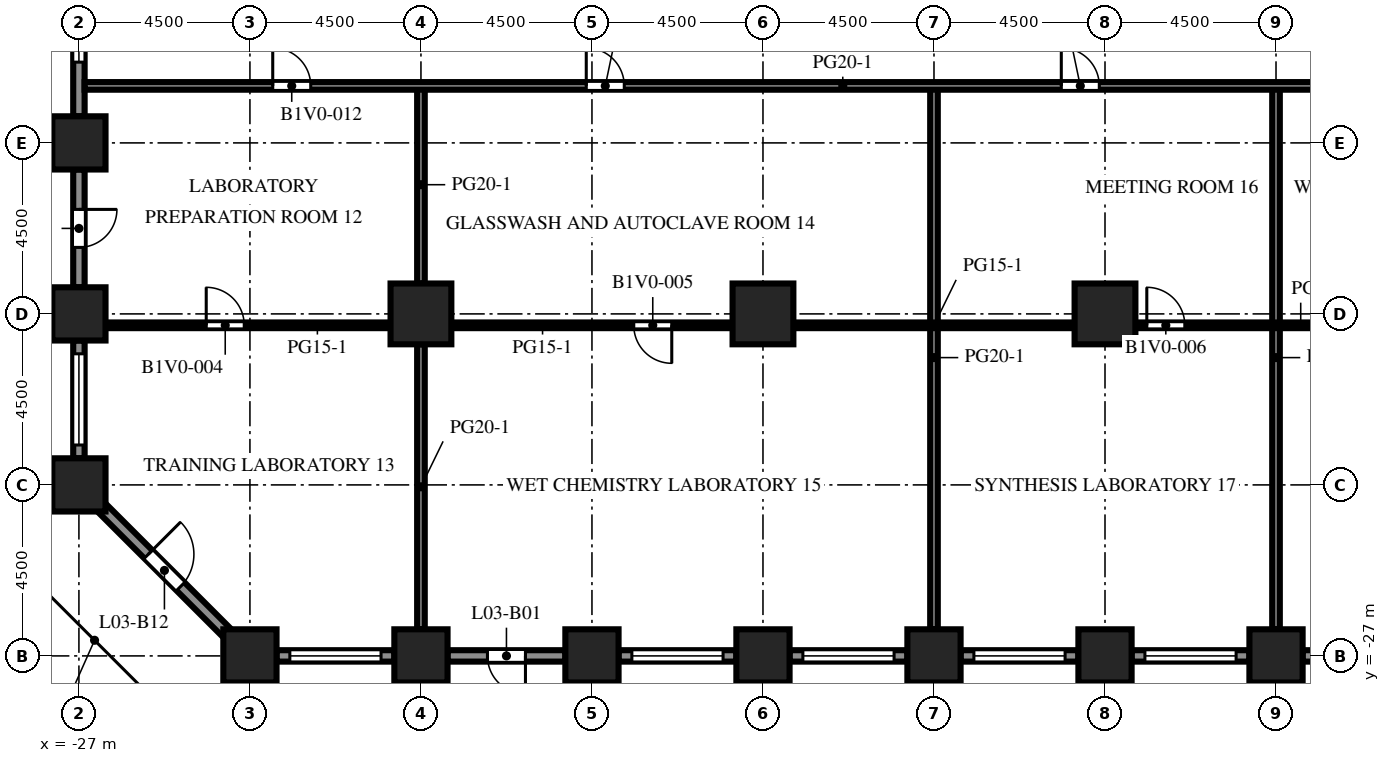
"""IFC4 building model, lengths in metres.
Left out: names, types, materials, properties, quantities, classifications, styles, units other than length and angle.
Written with IfcOpenShell. Run it as: python <this file> out.ifc"""

import sys

from ifc_helpers import new_model, si_unit, direction, frame, frame_2d, origin, origin_2d, place, context, subcontext, project, spatial, rectangle, extrude, element, fill, save


model = new_model("IFC4")
c1 = context("Model", 3, precision=1e-05, world=origin(), true_north=direction((0.0, 1.0)))
c2 = subcontext(c1, "Body", "Model", "MODEL_VIEW")
j1 = project(units=[si_unit("LENGTHUNIT", "METRE"), si_unit("PLANEANGLEUNIT", "RADIAN")], contexts=[c1])
p1 = place(None, origin())
s1 = spatial("IfcSite", under=j1, at=p1, CompositionType="ELEMENT")
p2 = place(p1, origin())
s2 = spatial("IfcBuilding", under=s1, at=p2, CompositionType="ELEMENT")
p3 = place(p2, frame((0.0, 0.0, 15.4)))
s3 = spatial("IfcBuildingStorey", under=s2, at=p3, CompositionType="ELEMENT", Elevation=15.4)
for number, where, z_axis, x_axis in (
    (1, (-27.0, -22.5, 0.0), (0.0, 0.0, 1.0), (1.0, 0.0, 0.0)),
    (2, (-27.0, -18.0, 0.0), (0.0, 0.0, 1.0), (1.0, 0.0, 0.0)),
    (3, (-27.0, -13.5, 0.0), (0.0, 0.0, 1.0), (1.0, 0.0, 0.0)),
    (4, (-22.5, -27.0, 0.0), (0.0, 0.0, 1.0), (1.0, 0.0, 0.0)),
    (5, (-18.0, -27.0, 0.0), (0.0, 0.0, 1.0), (1.0, 0.0, 0.0)),
    (6, (-13.5, -27.0, 0.0), (0.0, 0.0, 1.0), (1.0, 0.0, 0.0)),
    (7, (-9.0, -27.0, 0.0), (0.0, 0.0, 1.0), (1.0, 0.0, 0.0)),
    (8, (-4.5, -27.0, 0.0), (0.0, 0.0, 1.0), (1.0, 0.0, 0.0)),
    (9, (0.0, -27.0, 0.0), (0.0, 0.0, 1.0), (1.0, 0.0, 0.0)),
    (10, (4.5, -27.0, 0.0), (0.0, 0.0, 1.0), (1.0, 0.0, 0.0)),
):
    element("IfcColumn", number, at=place(p3, frame(where, z_axis=z_axis, x_axis=x_axis)), inside=s3, PredefinedType="COLUMN", context=c2, shape_type="SweptSolid", body=[
        extrude(rectangle(XDim=1.4, YDim=1.4, at=origin_2d()), origin(), (0.0, 0.0, 1.0), 4.1),
    ])
for number, where, z_axis, x_axis in (
    (11, (-18.0, -18.0, 0.0), (0.0, 0.0, 1.0), (1.0, 0.0, 0.0)),
    (12, (-9.0, -18.0, 0.0), (0.0, 0.0, 1.0), (1.0, 0.0, 0.0)),
    (13, (0.0, -18.0, 0.0), (0.0, 0.0, 1.0), (1.0, 0.0, 0.0)),
):
    element("IfcColumn", number, at=place(p3, frame(where, z_axis=z_axis, x_axis=x_axis)), inside=s3, PredefinedType="COLUMN", context=c2, shape_type="SweptSolid", body=[
        extrude(rectangle(XDim=1.6, YDim=1.6, at=origin_2d()), origin(), (0.0, 0.0, 1.0), 4.1),
    ])
p4 = place(p3, frame((-18.7, -27.0, 0.0), z_axis=(0.0, 0.0, 1.0), x_axis=(-1.0, 0.0, 0.0)))
e14 = element("IfcWall", 14, at=p4, inside=s3, PredefinedType="SOLIDWALL", context=c2, shape_type="SweptSolid", body=[
    extrude(rectangle(XDim=3.1, YDim=0.3, at=frame_2d((1.55, 0.0))), origin(), (0.0, 0.0, 1.0), 2.75),
])
p5 = place(p4, frame((0.35, 0.0, 0.8)))
e15 = element("IfcOpeningElement", 15, at=p5, cuts=e14, PredefinedType="OPENING", context=c2, shape_type="SweptSolid", body=[
    extrude(rectangle(XDim=2.4, YDim=1.7, at=frame_2d((1.2, 0.85))), frame((0.0, 0.16, 0.0), z_axis=(0.0, -1.0, 0.0), x_axis=(1.0, 0.0, 0.0)), (0.0, 0.0, 1.0), 0.32),
])
p6 = place(p3, frame((-14.2, -27.0, 0.0), z_axis=(0.0, 0.0, 1.0), x_axis=(-1.0, 0.0, 0.0)))
e16 = element("IfcWall", 16, at=p6, inside=s3, PredefinedType="SOLIDWALL", context=c2, shape_type="SweptSolid", body=[
    extrude(rectangle(XDim=3.1, YDim=0.3, at=frame_2d((1.55, 0.0))), origin(), (0.0, 0.0, 1.0), 2.75),
])
p7 = place(p6, frame((1.05, 0.0, 0.0)))
e17 = element("IfcOpeningElement", 17, at=p7, cuts=e16, PredefinedType="OPENING", context=c2, shape_type="SweptSolid", body=[
    extrude(rectangle(XDim=1.0, YDim=2.2, at=frame_2d((0.5, 1.1))), frame((0.0, 0.16, 0.0), z_axis=(0.0, -1.0, 0.0), x_axis=(1.0, 0.0, 0.0)), (0.0, 0.0, 1.0), 0.32),
])
p8 = place(p3, frame((-9.7, -27.0, 0.0), z_axis=(0.0, 0.0, 1.0), x_axis=(-1.0, 0.0, 0.0)))
e18 = element("IfcWall", 18, at=p8, inside=s3, PredefinedType="SOLIDWALL", context=c2, shape_type="SweptSolid", body=[
    extrude(rectangle(XDim=3.1, YDim=0.3, at=frame_2d((1.55, 0.0))), origin(), (0.0, 0.0, 1.0), 2.75),
])
p9 = place(p8, frame((0.35, 0.0, 0.8)))
e19 = element("IfcOpeningElement", 19, at=p9, cuts=e18, PredefinedType="OPENING", context=c2, shape_type="SweptSolid", body=[
    extrude(rectangle(XDim=2.4, YDim=1.7, at=frame_2d((1.2, 0.85))), frame((0.0, 0.16, 0.0), z_axis=(0.0, -1.0, 0.0), x_axis=(1.0, 0.0, 0.0)), (0.0, 0.0, 1.0), 0.32),
])
p10 = place(p3, frame((-5.2, -27.0, 0.0), z_axis=(0.0, 0.0, 1.0), x_axis=(-1.0, 0.0, 0.0)))
e20 = element("IfcWall", 20, at=p10, inside=s3, PredefinedType="SOLIDWALL", context=c2, shape_type="SweptSolid", body=[
    extrude(rectangle(XDim=3.1, YDim=0.3, at=frame_2d((1.55, 0.0))), origin(), (0.0, 0.0, 1.0), 2.75),
])
p11 = place(p10, frame((0.35, 0.0, 0.8)))
e21 = element("IfcOpeningElement", 21, at=p11, cuts=e20, PredefinedType="OPENING", context=c2, shape_type="SweptSolid", body=[
    extrude(rectangle(XDim=2.4, YDim=1.7, at=frame_2d((1.2, 0.85))), frame((0.0, 0.16, 0.0), z_axis=(0.0, -1.0, 0.0), x_axis=(1.0, 0.0, 0.0)), (0.0, 0.0, 1.0), 0.32),
])
p12 = place(p3, frame((-0.7, -27.0, 0.0), z_axis=(0.0, 0.0, 1.0), x_axis=(-1.0, 0.0, 0.0)))
e22 = element("IfcWall", 22, at=p12, inside=s3, PredefinedType="SOLIDWALL", context=c2, shape_type="SweptSolid", body=[
    extrude(rectangle(XDim=3.1, YDim=0.3, at=frame_2d((1.55, 0.0))), origin(), (0.0, 0.0, 1.0), 2.75),
])
p13 = place(p12, frame((0.35, 0.0, 0.8)))
e23 = element("IfcOpeningElement", 23, at=p13, cuts=e22, PredefinedType="OPENING", context=c2, shape_type="SweptSolid", body=[
    extrude(rectangle(XDim=2.4, YDim=1.7, at=frame_2d((1.2, 0.85))), frame((0.0, 0.16, 0.0), z_axis=(0.0, -1.0, 0.0), x_axis=(1.0, 0.0, 0.0)), (0.0, 0.0, 1.0), 0.32),
])
p14 = place(p3, frame((3.8, -27.0, 0.0), z_axis=(0.0, 0.0, 1.0), x_axis=(-1.0, 0.0, 0.0)))
e24 = element("IfcWall", 24, at=p14, inside=s3, PredefinedType="SOLIDWALL", context=c2, shape_type="SweptSolid", body=[
    extrude(rectangle(XDim=3.1, YDim=0.3, at=frame_2d((1.55, 0.0))), origin(), (0.0, 0.0, 1.0), 2.75),
])
p15 = place(p14, frame((0.35, 0.0, 0.8)))
e25 = element("IfcOpeningElement", 25, at=p15, cuts=e24, PredefinedType="OPENING", context=c2, shape_type="SweptSolid", body=[
    extrude(rectangle(XDim=2.4, YDim=1.7, at=frame_2d((1.2, 0.85))), frame((0.0, 0.16, 0.0), z_axis=(0.0, -1.0, 0.0), x_axis=(1.0, 0.0, 0.0)), (0.0, 0.0, 1.0), 0.32),
])
p16 = place(p3, frame((8.3, -27.0, 0.0), z_axis=(0.0, 0.0, 1.0), x_axis=(-1.0, 0.0, 0.0)))
e26 = element("IfcWall", 26, at=p16, inside=s3, PredefinedType="SOLIDWALL", context=c2, shape_type="SweptSolid", body=[
    extrude(rectangle(XDim=3.1, YDim=0.3, at=frame_2d((1.55, 0.0))), origin(), (0.0, 0.0, 1.0), 2.75),
])
p17 = place(p16, frame((0.35, 0.0, 0.8)))
e27 = element("IfcOpeningElement", 27, at=p17, cuts=e26, PredefinedType="OPENING", context=c2, shape_type="SweptSolid", body=[
    extrude(rectangle(XDim=2.4, YDim=1.7, at=frame_2d((1.2, 0.85))), frame((0.0, 0.16, 0.0), z_axis=(0.0, -1.0, 0.0), x_axis=(1.0, 0.0, 0.0)), (0.0, 0.0, 1.0), 0.32),
])
p18 = place(p3, frame((-27.0, -12.8, 0.0), z_axis=(0.0, 0.0, 1.0), x_axis=(0.0, 1.0, 0.0)))
e28 = element("IfcWall", 28, at=p18, inside=s3, PredefinedType="SOLIDWALL", context=c2, shape_type="SweptSolid", body=[
    extrude(rectangle(XDim=3.1, YDim=0.3, at=frame_2d((1.55, 0.0))), origin(), (0.0, 0.0, 1.0), 2.75),
])
p19 = place(p18, frame((1.425, 0.0, 0.8)))
e29 = element("IfcOpeningElement", 29, at=p19, cuts=e28, PredefinedType="OPENING", context=c2, shape_type="SweptSolid", body=[
    extrude(rectangle(XDim=1.2, YDim=1.7, at=frame_2d((0.6, 0.85))), frame((0.0, 0.16, 0.0), z_axis=(0.0, -1.0, 0.0), x_axis=(1.0, 0.0, 0.0)), (0.0, 0.0, 1.0), 0.32),
])
p20 = place(p3, frame((-27.0, -17.3, 0.0), z_axis=(0.0, 0.0, 1.0), x_axis=(0.0, 1.0, 0.0)))
e30 = element("IfcWall", 30, at=p20, inside=s3, PredefinedType="SOLIDWALL", context=c2, shape_type="SweptSolid", body=[
    extrude(rectangle(XDim=3.1, YDim=0.3, at=frame_2d((1.55, 0.0))), origin(), (0.0, 0.0, 1.0), 2.75),
])
p21 = place(p20, frame((1.05, 0.0, 0.0)))
e31 = element("IfcOpeningElement", 31, at=p21, cuts=e30, PredefinedType="OPENING", context=c2, shape_type="SweptSolid", body=[
    extrude(rectangle(XDim=1.0, YDim=2.2, at=frame_2d((0.5, 1.1))), frame((0.0, 0.16, 0.0), z_axis=(0.0, -1.0, 0.0), x_axis=(1.0, 0.0, 0.0)), (0.0, 0.0, 1.0), 0.32),
])
p22 = place(p3, frame((-27.0, -21.8, 0.0), z_axis=(0.0, 0.0, 1.0), x_axis=(0.0, 1.0, 0.0)))
e32 = element("IfcWall", 32, at=p22, inside=s3, PredefinedType="SOLIDWALL", context=c2, shape_type="SweptSolid", body=[
    extrude(rectangle(XDim=3.1, YDim=0.3, at=frame_2d((1.55, 0.0))), origin(), (0.0, 0.0, 1.0), 2.75),
])
p23 = place(p22, frame((0.35, 0.0, 0.8)))
e33 = element("IfcOpeningElement", 33, at=p23, cuts=e32, PredefinedType="OPENING", context=c2, shape_type="SweptSolid", body=[
    extrude(rectangle(XDim=2.4, YDim=1.7, at=frame_2d((1.2, 0.85))), frame((0.0, 0.16, 0.0), z_axis=(0.0, -1.0, 0.0), x_axis=(1.0, 0.0, 0.0)), (0.0, 0.0, 1.0), 0.32),
])
p24 = place(p3, frame((-23.094, -26.406, 0.0), z_axis=(0.0, 0.0, 1.0), x_axis=(-0.707106781187, 0.707106781187, 0.0)))
e34 = element("IfcWall", 34, at=p24, inside=s3, PredefinedType="SOLIDWALL", context=c2, shape_type="SweptSolid", body=[
    extrude(rectangle(XDim=4.684, YDim=0.3, at=frame_2d((2.342, 0.0))), origin(), (0.0, 0.0, 1.0), 2.75),
])
p25 = place(p24, frame((1.742, 0.0, 0.0)))
e35 = element("IfcOpeningElement", 35, at=p25, cuts=e34, PredefinedType="OPENING", context=c2, shape_type="SweptSolid", body=[
    extrude(rectangle(XDim=1.2, YDim=2.2, at=frame_2d((0.6, 1.1))), frame((0.0, 0.16, 0.0), z_axis=(0.0, -1.0, 0.0), x_axis=(1.0, 0.0, 0.0)), (0.0, 0.0, 1.0), 0.32),
])
p26 = place(p3, frame((-18.0, -26.3, 0.0), z_axis=(0.0, 0.0, 1.0), x_axis=(0.0, 1.0, 0.0)))
e36 = element("IfcWall", 36, at=p26, inside=s3, PredefinedType="PARTITIONING", context=c2, shape_type="SweptSolid", body=[
    extrude(rectangle(XDim=7.5, YDim=0.2, at=frame_2d((3.75, 0.0))), origin(), (0.0, 0.0, 1.0), 3.65),
])
p27 = place(p3, frame((-18.0, -17.2, 0.0), z_axis=(0.0, 0.0, 1.0), x_axis=(0.0, 1.0, 0.0)))
e37 = element("IfcWall", 37, at=p27, inside=s3, PredefinedType="PARTITIONING", context=c2, shape_type="SweptSolid", body=[
    extrude(rectangle(XDim=5.2, YDim=0.2, at=frame_2d((2.6, 0.0))), origin(), (0.0, 0.0, 1.0), 3.65),
])
for number, where, z_axis, x_axis in (
    (38, (-4.5, -26.3, 0.0), (0.0, 0.0, 1.0), (0.0, 1.0, 0.0)),
    (39, (4.5, -26.3, 0.0), (0.0, 0.0, 1.0), (0.0, 1.0, 0.0)),
):
    element("IfcWall", number, at=place(p3, frame(where, z_axis=z_axis, x_axis=x_axis)), inside=s3, PredefinedType="PARTITIONING", context=c2, shape_type="SweptSolid", body=[
        extrude(rectangle(XDim=14.3, YDim=0.2, at=frame_2d((7.15, 0.0))), origin(), (0.0, 0.0, 1.0), 3.65),
    ])
p28 = place(p3, frame((-18.8, -18.3, 0.0), z_axis=(0.0, 0.0, 1.0), x_axis=(-1.0, 0.0, 0.0)))
e40 = element("IfcWall", 40, at=p28, inside=s3, PredefinedType="PARTITIONING", context=c2, shape_type="SweptSolid", body=[
    extrude(rectangle(XDim=7.5, YDim=0.15, at=frame_2d((3.75, 0.0))), origin(), (0.0, 0.0, 1.0), 3.65),
])
p29 = place(p28, frame((3.85, 0.0, 0.0)))
e41 = element("IfcOpeningElement", 41, at=p29, cuts=e40, PredefinedType="OPENING", context=c2, shape_type="SweptSolid", body=[
    extrude(rectangle(XDim=1.0, YDim=2.1, at=frame_2d((0.5, 1.05))), frame((0.0, 0.085, 0.0), z_axis=(0.0, -1.0, 0.0), x_axis=(1.0, 0.0, 0.0)), (0.0, 0.0, 1.0), 0.17),
])
p30 = place(p3, frame((-9.8, -18.3, 0.0), z_axis=(0.0, 0.0, 1.0), x_axis=(-1.0, 0.0, 0.0)))
e42 = element("IfcWall", 42, at=p30, inside=s3, PredefinedType="PARTITIONING", context=c2, shape_type="SweptSolid", body=[
    extrude(rectangle(XDim=7.4, YDim=0.15, at=frame_2d((3.7, 0.0))), origin(), (0.0, 0.0, 1.0), 3.65),
])
p31 = place(p30, frame((1.6, 0.0, 0.0)))
e43 = element("IfcOpeningElement", 43, at=p31, cuts=e42, PredefinedType="OPENING", context=c2, shape_type="SweptSolid", body=[
    extrude(rectangle(XDim=1.0, YDim=2.1, at=frame_2d((0.5, 1.05))), frame((0.0, 0.085, 0.0), z_axis=(0.0, -1.0, 0.0), x_axis=(1.0, 0.0, 0.0)), (0.0, 0.0, 1.0), 0.17),
])
p32 = place(p3, frame((-8.2, -18.3, 0.0), z_axis=(0.0, 0.0, 1.0), x_axis=(1.0, 0.0, 0.0)))
e44 = element("IfcWall", 44, at=p32, inside=s3, PredefinedType="PARTITIONING", context=c2, shape_type="SweptSolid", body=[
    extrude(rectangle(XDim=7.4, YDim=0.15, at=frame_2d((3.7, 0.0))), origin(), (0.0, 0.0, 1.0), 3.65),
])
p33 = place(p3, frame((8.2, -18.3, 0.0), z_axis=(0.0, 0.0, 1.0), x_axis=(-1.0, 0.0, 0.0)))
e45 = element("IfcWall", 45, at=p33, inside=s3, PredefinedType="PARTITIONING", context=c2, shape_type="SweptSolid", body=[
    extrude(rectangle(XDim=7.4, YDim=0.15, at=frame_2d((3.7, 0.0))), origin(), (0.0, 0.0, 1.0), 3.65),
])
p34 = place(p33, frame((6.1, 0.0, 0.0)))
e46 = element("IfcOpeningElement", 46, at=p34, cuts=e45, PredefinedType="OPENING", context=c2, shape_type="SweptSolid", body=[
    extrude(rectangle(XDim=1.0, YDim=2.1, at=frame_2d((0.5, 1.05))), frame((0.0, 0.085, 0.0), z_axis=(0.0, -1.0, 0.0), x_axis=(1.0, 0.0, 0.0)), (0.0, 0.0, 1.0), 0.17),
])
p35 = place(p3, frame((26.85, -12.0, 0.0), z_axis=(0.0, 0.0, 1.0), x_axis=(-1.0, 0.0, 0.0)))
e47 = element("IfcWall", 47, at=p35, inside=s3, PredefinedType="PARTITIONING", context=c2, shape_type="SweptSolid", body=[
    extrude(rectangle(XDim=53.7, YDim=0.2, at=frame_2d((26.85, 0.0))), origin(), (0.0, 0.0, 1.0), 3.65),
])
p36 = place(p35, frame((47.75, 0.0, 0.0)))
e48 = element("IfcOpeningElement", 48, at=p36, cuts=e47, PredefinedType="OPENING", context=c2, shape_type="SweptSolid", body=[
    extrude(rectangle(XDim=1.0, YDim=2.1, at=frame_2d((0.5, 1.05))), frame((0.0, 0.11, 0.0), z_axis=(0.0, -1.0, 0.0), x_axis=(1.0, 0.0, 0.0)), (0.0, 0.0, 1.0), 0.22),
])
p37 = place(p35, frame((39.5, 0.0, 0.0)))
e49 = element("IfcOpeningElement", 49, at=p37, cuts=e47, PredefinedType="OPENING", context=c2, shape_type="SweptSolid", body=[
    extrude(rectangle(XDim=1.0, YDim=2.1, at=frame_2d((0.5, 1.05))), frame((0.0, 0.11, 0.0), z_axis=(0.0, -1.0, 0.0), x_axis=(1.0, 0.0, 0.0)), (0.0, 0.0, 1.0), 0.22),
])
p38 = place(p35, frame((27.0, 0.0, 0.0)))
e50 = element("IfcOpeningElement", 50, at=p38, cuts=e47, PredefinedType="OPENING", context=c2, shape_type="SweptSolid", body=[
    extrude(rectangle(XDim=1.0, YDim=2.1, at=frame_2d((0.5, 1.05))), frame((0.0, 0.11, 0.0), z_axis=(0.0, -1.0, 0.0), x_axis=(1.0, 0.0, 0.0)), (0.0, 0.0, 1.0), 0.22),
])
p39 = place(p35, frame((17.0, 0.0, 0.0)))
e51 = element("IfcOpeningElement", 51, at=p39, cuts=e47, PredefinedType="OPENING", context=c2, shape_type="SweptSolid", body=[
    extrude(rectangle(XDim=1.0, YDim=2.1, at=frame_2d((0.5, 1.05))), frame((0.0, 0.11, 0.0), z_axis=(0.0, -1.0, 0.0), x_axis=(1.0, 0.0, 0.0)), (0.0, 0.0, 1.0), 0.22),
])
p40 = place(p35, frame((10.0, 0.0, 0.0)))
e52 = element("IfcOpeningElement", 52, at=p40, cuts=e47, PredefinedType="OPENING", context=c2, shape_type="SweptSolid", body=[
    extrude(rectangle(XDim=1.0, YDim=2.1, at=frame_2d((0.5, 1.05))), frame((0.0, 0.11, 0.0), z_axis=(0.0, -1.0, 0.0), x_axis=(1.0, 0.0, 0.0)), (0.0, 0.0, 1.0), 0.22),
])
p41 = place(p35, frame((4.0, 0.0, 0.0)))
e53 = element("IfcOpeningElement", 53, at=p41, cuts=e47, PredefinedType="OPENING", context=c2, shape_type="SweptSolid", body=[
    extrude(rectangle(XDim=1.0, YDim=2.1, at=frame_2d((0.5, 1.05))), frame((0.0, 0.11, 0.0), z_axis=(0.0, -1.0, 0.0), x_axis=(1.0, 0.0, 0.0)), (0.0, 0.0, 1.0), 0.22),
])
p42 = place(p5, origin())
e54 = element("IfcWindow", 54, at=p42, inside=s3, PartitioningType="SINGLE_PANEL", PredefinedType="WINDOW", context=c2, shape_type="SweptSolid", body=[
    extrude(rectangle(XDim=2.4, YDim=1.7, at=frame_2d((1.2, 0.85))), frame((0.0, 0.03, 0.0), z_axis=(0.0, -1.0, 0.0), x_axis=(1.0, 0.0, 0.0)), (0.0, 0.0, 1.0), 0.06),
])
fill(e15, e54)
p43 = place(p7, origin())
e55 = element("IfcDoor", 55, at=p43, inside=s3, OperationType="SINGLE_SWING_LEFT", PredefinedType="DOOR", context=c2, shape_type="SweptSolid", body=[
    extrude(rectangle(XDim=1.0, YDim=2.2, at=frame_2d((0.5, 1.1))), frame((0.0, 0.025, 0.0), z_axis=(0.0, -1.0, 0.0), x_axis=(1.0, 0.0, 0.0)), (0.0, 0.0, 1.0), 0.05),
])
fill(e17, e55)
p44 = place(p9, origin())
e56 = element("IfcWindow", 56, at=p44, inside=s3, PartitioningType="SINGLE_PANEL", PredefinedType="WINDOW", context=c2, shape_type="SweptSolid", body=[
    extrude(rectangle(XDim=2.4, YDim=1.7, at=frame_2d((1.2, 0.85))), frame((0.0, 0.03, 0.0), z_axis=(0.0, -1.0, 0.0), x_axis=(1.0, 0.0, 0.0)), (0.0, 0.0, 1.0), 0.06),
])
fill(e19, e56)
p45 = place(p11, origin())
e57 = element("IfcWindow", 57, at=p45, inside=s3, PartitioningType="SINGLE_PANEL", PredefinedType="WINDOW", context=c2, shape_type="SweptSolid", body=[
    extrude(rectangle(XDim=2.4, YDim=1.7, at=frame_2d((1.2, 0.85))), frame((0.0, 0.03, 0.0), z_axis=(0.0, -1.0, 0.0), x_axis=(1.0, 0.0, 0.0)), (0.0, 0.0, 1.0), 0.06),
])
fill(e21, e57)
p46 = place(p13, origin())
e58 = element("IfcWindow", 58, at=p46, inside=s3, PartitioningType="SINGLE_PANEL", PredefinedType="WINDOW", context=c2, shape_type="SweptSolid", body=[
    extrude(rectangle(XDim=2.4, YDim=1.7, at=frame_2d((1.2, 0.85))), frame((0.0, 0.03, 0.0), z_axis=(0.0, -1.0, 0.0), x_axis=(1.0, 0.0, 0.0)), (0.0, 0.0, 1.0), 0.06),
])
fill(e23, e58)
p47 = place(p15, origin())
e59 = element("IfcWindow", 59, at=p47, inside=s3, PartitioningType="SINGLE_PANEL", PredefinedType="WINDOW", context=c2, shape_type="SweptSolid", body=[
    extrude(rectangle(XDim=2.4, YDim=1.7, at=frame_2d((1.2, 0.85))), frame((0.0, 0.03, 0.0), z_axis=(0.0, -1.0, 0.0), x_axis=(1.0, 0.0, 0.0)), (0.0, 0.0, 1.0), 0.06),
])
fill(e25, e59)
p48 = place(p19, origin())
e60 = element("IfcWindow", 60, at=p48, inside=s3, PartitioningType="SINGLE_PANEL", PredefinedType="WINDOW", context=c2, shape_type="SweptSolid", body=[
    extrude(rectangle(XDim=1.2, YDim=1.7, at=frame_2d((0.6, 0.85))), frame((0.0, 0.03, 0.0), z_axis=(0.0, -1.0, 0.0), x_axis=(1.0, 0.0, 0.0)), (0.0, 0.0, 1.0), 0.06),
])
fill(e29, e60)
p49 = place(p21, origin())
e61 = element("IfcDoor", 61, at=p49, inside=s3, OperationType="SINGLE_SWING_RIGHT", PredefinedType="DOOR", context=c2, shape_type="SweptSolid", body=[
    extrude(rectangle(XDim=1.0, YDim=2.2, at=frame_2d((0.5, 1.1))), frame((0.0, 0.025, 0.0), z_axis=(0.0, -1.0, 0.0), x_axis=(1.0, 0.0, 0.0)), (0.0, 0.0, 1.0), 0.05),
])
fill(e31, e61)
p50 = place(p23, origin())
e62 = element("IfcWindow", 62, at=p50, inside=s3, PartitioningType="SINGLE_PANEL", PredefinedType="WINDOW", context=c2, shape_type="SweptSolid", body=[
    extrude(rectangle(XDim=2.4, YDim=1.7, at=frame_2d((1.2, 0.85))), frame((0.0, 0.03, 0.0), z_axis=(0.0, -1.0, 0.0), x_axis=(1.0, 0.0, 0.0)), (0.0, 0.0, 1.0), 0.06),
])
fill(e33, e62)
p51 = place(p25, origin())
e63 = element("IfcDoor", 63, at=p51, inside=s3, OperationType="SINGLE_SWING_RIGHT", PredefinedType="DOOR", context=c2, shape_type="SweptSolid", body=[
    extrude(rectangle(XDim=1.2, YDim=2.2, at=frame_2d((0.6, 1.1))), frame((0.0, 0.025, 0.0), z_axis=(0.0, -1.0, 0.0), x_axis=(1.0, 0.0, 0.0)), (0.0, 0.0, 1.0), 0.05),
])
fill(e35, e63)
p52 = place(p29, origin())
e64 = element("IfcDoor", 64, at=p52, inside=s3, OperationType="SINGLE_SWING_RIGHT", PredefinedType="DOOR", context=c2, shape_type="SweptSolid", body=[
    extrude(rectangle(XDim=1.0, YDim=2.1, at=frame_2d((0.5, 1.05))), frame((0.0, 0.025, 0.0), z_axis=(0.0, -1.0, 0.0), x_axis=(1.0, 0.0, 0.0)), (0.0, 0.0, 1.0), 0.05),
])
fill(e41, e64)
p53 = place(p31, origin())
e65 = element("IfcDoor", 65, at=p53, inside=s3, OperationType="SINGLE_SWING_LEFT", PredefinedType="DOOR", context=c2, shape_type="SweptSolid", body=[
    extrude(rectangle(XDim=1.0, YDim=2.1, at=frame_2d((0.5, 1.05))), frame((0.0, 0.025, 0.0), z_axis=(0.0, -1.0, 0.0), x_axis=(1.0, 0.0, 0.0)), (0.0, 0.0, 1.0), 0.05),
])
fill(e43, e65)
p54 = place(p34, origin())
e66 = element("IfcDoor", 66, at=p54, inside=s3, OperationType="SINGLE_SWING_RIGHT", PredefinedType="DOOR", context=c2, shape_type="SweptSolid", body=[
    extrude(rectangle(XDim=1.0, YDim=2.1, at=frame_2d((0.5, 1.05))), frame((0.0, 0.025, 0.0), z_axis=(0.0, -1.0, 0.0), x_axis=(1.0, 0.0, 0.0)), (0.0, 0.0, 1.0), 0.05),
])
fill(e46, e66)
p55 = place(p36, origin())
e67 = element("IfcDoor", 67, at=p55, inside=s3, OperationType="SINGLE_SWING_RIGHT", PredefinedType="DOOR", context=c2, shape_type="SweptSolid", body=[
    extrude(rectangle(XDim=1.0, YDim=2.1, at=frame_2d((0.5, 1.05))), frame((0.0, 0.025, 0.0), z_axis=(0.0, -1.0, 0.0), x_axis=(1.0, 0.0, 0.0)), (0.0, 0.0, 1.0), 0.05),
])
fill(e48, e67)
p56 = place(p37, origin())
e68 = element("IfcDoor", 68, at=p56, inside=s3, OperationType="SINGLE_SWING_RIGHT", PredefinedType="DOOR", context=c2, shape_type="SweptSolid", body=[
    extrude(rectangle(XDim=1.0, YDim=2.1, at=frame_2d((0.5, 1.05))), frame((0.0, 0.025, 0.0), z_axis=(0.0, -1.0, 0.0), x_axis=(1.0, 0.0, 0.0)), (0.0, 0.0, 1.0), 0.05),
])
fill(e49, e68)
p57 = place(p38, origin())
e69 = element("IfcDoor", 69, at=p57, inside=s3, OperationType="SINGLE_SWING_RIGHT", PredefinedType="DOOR", context=c2, shape_type="SweptSolid", body=[
    extrude(rectangle(XDim=1.0, YDim=2.1, at=frame_2d((0.5, 1.05))), frame((0.0, 0.025, 0.0), z_axis=(0.0, -1.0, 0.0), x_axis=(1.0, 0.0, 0.0)), (0.0, 0.0, 1.0), 0.05),
])
fill(e50, e69)
save(model, sys.argv[1])
